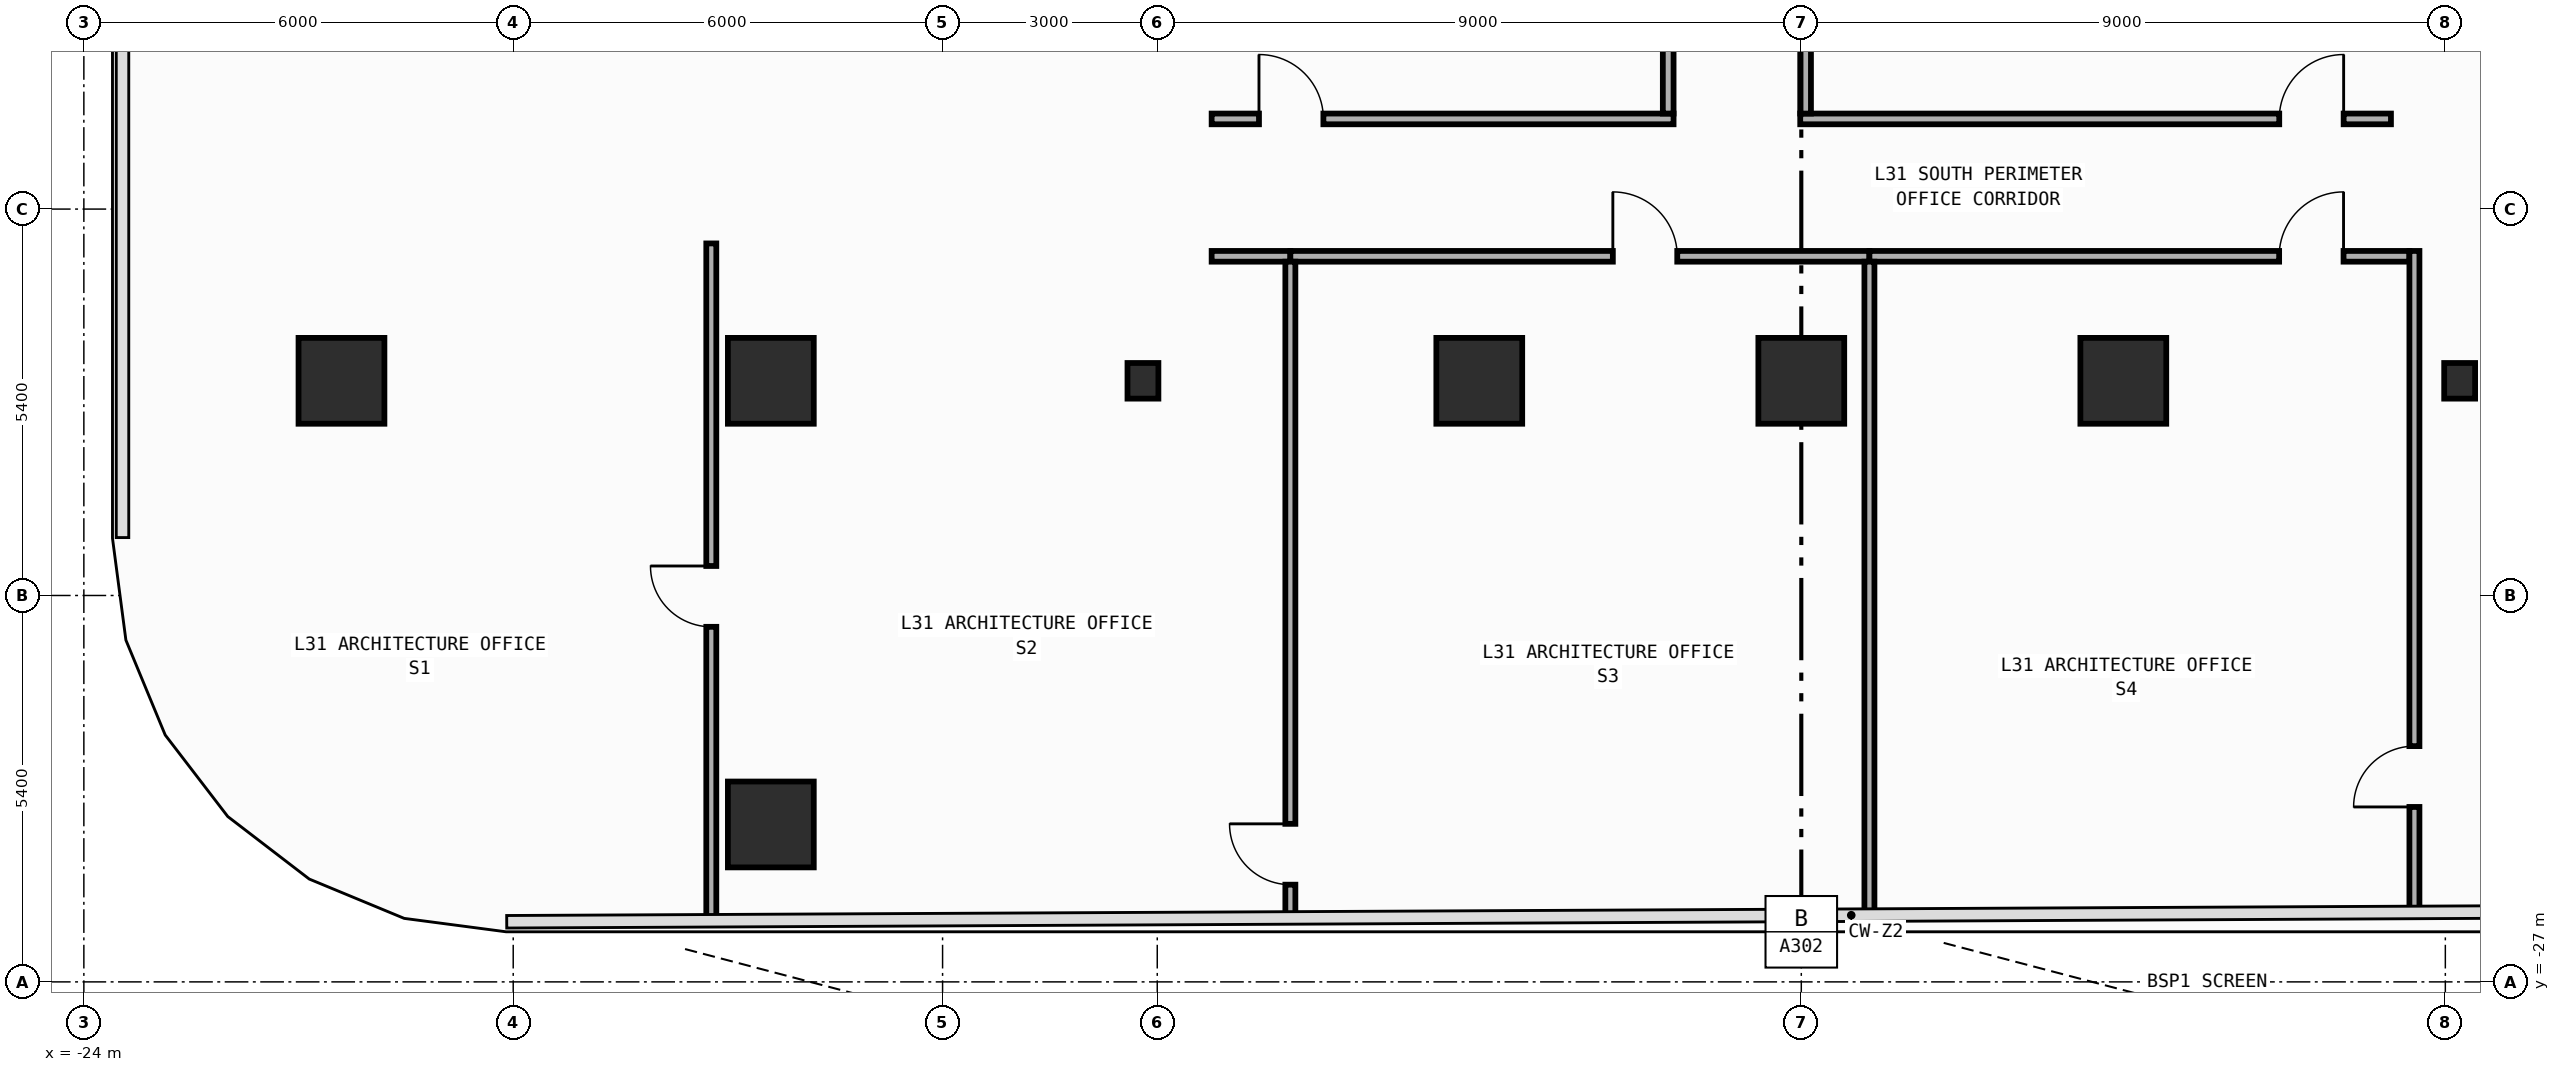
"""IFC4 building model, lengths in metres.
Left out: names, types, materials, properties, quantities, classifications, styles, units other than length and angle.
Written with IfcOpenShell. Run it as: python <this file> out.ifc"""

import sys

from ifc_helpers import new_model, si_unit, direction, frame, frame_2d, origin, origin_2d, place, context, subcontext, project, spatial, rectangle, i_section, extrude, element, fill, save


model = new_model("IFC4")
c1 = context("Model", 3, precision=1e-05, world=origin(), true_north=direction((0.0, 1.0)))
c2 = subcontext(c1, "Body", "Model", "MODEL_VIEW")
j1 = project(units=[si_unit("LENGTHUNIT", "METRE"), si_unit("PLANEANGLEUNIT", "RADIAN")], contexts=[c1])
p1 = place(None, origin())
s1 = spatial("IfcSite", under=j1, at=p1, CompositionType="ELEMENT")
p2 = place(p1, origin())
s2 = spatial("IfcBuilding", under=s1, at=p2, CompositionType="ELEMENT")
p3 = place(p2, frame((0.0, 0.0, 135.2)))
s3 = spatial("IfcBuildingStorey", under=s2, at=p3, CompositionType="ELEMENT", Elevation=135.2)
for number, where, z_axis, x_axis in (
    (1, (-9.2, -18.6, 0.0), (0.0, 0.0, 1.0), (1.0, 0.0, 0.0)),
    (2, (9.2, -18.6, 0.0), (0.0, 0.0, 1.0), (1.0, 0.0, 0.0)),
):
    element("IfcColumn", number, at=place(p3, frame(where, z_axis=z_axis, x_axis=x_axis)), inside=s3, PredefinedType="COLUMN", context=c2, shape_type="SweptSolid", body=[
        extrude(i_section(OverallWidth=0.432, OverallDepth=0.498, WebThickness=0.045, FlangeThickness=0.07, FilletRadius=0.022, at=origin_2d()), origin(), (0.0, 0.0, 1.0), 4.2),
    ])
for number, where, z_axis, x_axis in (
    (3, (-20.4, -18.6, 0.0), (0.0, 0.0, 1.0), (1.0, 0.0, 0.0)),
    (4, (-14.4, -18.6, 0.0), (0.0, 0.0, 1.0), (1.0, 0.0, 0.0)),
    (5, (-4.5, -18.6, 0.0), (0.0, 0.0, 1.0), (1.0, 0.0, 0.0)),
    (6, (0.0, -18.6, 0.0), (0.0, 0.0, 1.0), (1.0, 0.0, 0.0)),
    (7, (4.5, -18.6, 0.0), (0.0, 0.0, 1.0), (1.0, 0.0, 0.0)),
    (8, (-14.4, -24.8, 0.0), (0.0, 0.0, 1.0), (1.0, 0.0, 0.0)),
):
    element("IfcColumn", number, at=place(p3, frame(where, z_axis=z_axis, x_axis=x_axis)), inside=s3, PredefinedType="COLUMN", context=c2, shape_type="SweptSolid", body=[
        extrude(rectangle(XDim=1.2, YDim=1.2, at=origin_2d()), origin(), (0.0, 0.0, 1.0), 4.2),
    ])
p4 = place(p3, frame((-8.24, -16.86, 0.0), z_axis=(0.0, 0.0, 1.0), x_axis=(1.0, 0.0, 0.0)))
e9 = element("IfcWall", 9, at=p4, inside=s3, PredefinedType="PARTITIONING", context=c2, shape_type="SweptSolid", body=[
    extrude(rectangle(XDim=1.1, YDim=0.15, at=frame_2d((0.55, 0.0))), origin(), (0.0, 0.0, 1.0), 3.94),
])
p5 = place(p3, frame((-7.14, -16.86, 0.0), z_axis=(0.0, 0.0, 1.0), x_axis=(1.0, 0.0, 0.0)))
e10 = element("IfcWall", 10, at=p5, inside=s3, PredefinedType="PARTITIONING", context=c2, shape_type="SweptSolid", body=[
    extrude(rectangle(XDim=8.092, YDim=0.15, at=frame_2d((4.046, 0.0))), origin(), (0.0, 0.0, 1.0), 3.94),
])
p6 = place(p5, frame((4.507, 0.0, 0.0)))
e11 = element("IfcOpeningElement", 11, at=p6, cuts=e10, PredefinedType="OPENING", context=c2, shape_type="SweptSolid", body=[
    extrude(rectangle(XDim=0.9, YDim=2.15, at=frame_2d((0.45, 1.075))), frame((0.0, 0.085, 0.0), z_axis=(0.0, -1.0, 0.0), x_axis=(1.0, 0.0, 0.0)), (0.0, 0.0, 1.0), 0.17),
])
p7 = place(p3, frame((0.952, -16.86, 0.0), z_axis=(0.0, 0.0, 1.0), x_axis=(1.0, 0.0, 0.0)))
e12 = element("IfcWall", 12, at=p7, inside=s3, PredefinedType="PARTITIONING", context=c2, shape_type="SweptSolid", body=[
    extrude(rectangle(XDim=7.546, YDim=0.15, at=frame_2d((3.773, 0.0))), origin(), (0.0, 0.0, 1.0), 3.94),
])
p8 = place(p7, frame((5.726, 0.0, 0.0)))
e13 = element("IfcOpeningElement", 13, at=p8, cuts=e12, PredefinedType="OPENING", context=c2, shape_type="SweptSolid", body=[
    extrude(rectangle(XDim=0.9, YDim=2.15, at=frame_2d((0.45, 1.075))), frame((0.0, 0.085, 0.0), z_axis=(0.0, -1.0, 0.0), x_axis=(1.0, 0.0, 0.0)), (0.0, 0.0, 1.0), 0.17),
])
p9 = place(p3, frame((-8.24, -14.94, 0.0), z_axis=(0.0, 0.0, 1.0), x_axis=(1.0, 0.0, 0.0)))
e14 = element("IfcWall", 14, at=p9, inside=s3, PredefinedType="PARTITIONING", context=c2, shape_type="SweptSolid", body=[
    extrude(rectangle(XDim=6.455, YDim=0.15, at=frame_2d((3.228, 0.0))), origin(), (0.0, 0.0, 1.0), 3.94),
])
p10 = place(p9, frame((0.662, 0.0, 0.0)))
e15 = element("IfcOpeningElement", 15, at=p10, cuts=e14, PredefinedType="OPENING", context=c2, shape_type="SweptSolid", body=[
    extrude(rectangle(XDim=0.9, YDim=2.15, at=frame_2d((0.45, 1.075))), frame((0.0, 0.085, 0.0), z_axis=(0.0, -1.0, 0.0), x_axis=(1.0, 0.0, 0.0)), (0.0, 0.0, 1.0), 0.17),
])
p11 = place(p3, frame((-0.015, -14.94, 0.0), z_axis=(0.0, 0.0, 1.0), x_axis=(1.0, 0.0, 0.0)))
e16 = element("IfcWall", 16, at=p11, inside=s3, PredefinedType="PARTITIONING", context=c2, shape_type="SweptSolid", body=[
    extrude(rectangle(XDim=8.255, YDim=0.15, at=frame_2d((4.127, 0.0))), origin(), (0.0, 0.0, 1.0), 3.94),
])
p12 = place(p11, frame((6.694, 0.0, 0.0)))
e17 = element("IfcOpeningElement", 17, at=p12, cuts=e16, PredefinedType="OPENING", context=c2, shape_type="SweptSolid", body=[
    extrude(rectangle(XDim=0.9, YDim=2.15, at=frame_2d((0.45, 1.075))), frame((0.0, 0.085, 0.0), z_axis=(0.0, -1.0, 0.0), x_axis=(1.0, 0.0, 0.0)), (0.0, 0.0, 1.0), 0.17),
])
p13 = place(p3, frame((-1.86, -14.865, 0.0), z_axis=(0.0, 0.0, 1.0), x_axis=(0.0, 1.0, 0.0)))
e18 = element("IfcWall", 18, at=p13, inside=s3, PredefinedType="PARTITIONING", context=c2, shape_type="SweptSolid", body=[
    extrude(rectangle(XDim=5.675, YDim=0.15, at=frame_2d((2.837, 0.0))), origin(), (0.0, 0.0, 1.0), 3.94),
])
p14 = place(p13, frame((4.315, 0.0, 0.0)))
e19 = element("IfcOpeningElement", 19, at=p14, cuts=e18, PredefinedType="OPENING", context=c2, shape_type="SweptSolid", body=[
    extrude(rectangle(XDim=0.9, YDim=2.15, at=frame_2d((0.45, 1.075))), frame((0.0, 0.085, 0.0), z_axis=(0.0, -1.0, 0.0), x_axis=(1.0, 0.0, 0.0)), (0.0, 0.0, 1.0), 0.17),
])
p15 = place(p3, frame((0.06, -14.865, 0.0), z_axis=(0.0, 0.0, 1.0), x_axis=(0.0, 1.0, 0.0)))
e20 = element("IfcWall", 20, at=p15, inside=s3, PredefinedType="PARTITIONING", context=c2, shape_type="SweptSolid", body=[
    extrude(rectangle(XDim=5.675, YDim=0.15, at=frame_2d((2.837, 0.0))), origin(), (0.0, 0.0, 1.0), 3.94),
])
p16 = place(p15, frame((4.315, 0.0, 0.0)))
e21 = element("IfcOpeningElement", 21, at=p16, cuts=e20, PredefinedType="OPENING", context=c2, shape_type="SweptSolid", body=[
    extrude(rectangle(XDim=0.9, YDim=2.15, at=frame_2d((0.45, 1.075))), frame((0.0, 0.085, 0.0), z_axis=(0.0, -1.0, 0.0), x_axis=(1.0, 0.0, 0.0)), (0.0, 0.0, 1.0), 0.17),
])
p17 = place(p3, frame((-15.232, -26.141, 0.0), z_axis=(0.0, 0.0, 1.0), x_axis=(0.0, 1.0, 0.0)))
e22 = element("IfcWall", 22, at=p17, inside=s3, PredefinedType="PARTITIONING", context=c2, shape_type="SweptSolid", body=[
    extrude(rectangle(XDim=9.461, YDim=0.14, at=frame_2d((4.73, 0.0))), origin(), (0.0, 0.0, 1.0), 3.94),
])
p18 = place(p17, frame((4.103, 0.0, 0.0)))
e23 = element("IfcOpeningElement", 23, at=p18, cuts=e22, PredefinedType="OPENING", context=c2, shape_type="SweptSolid", body=[
    extrude(rectangle(XDim=0.85, YDim=2.1, at=frame_2d((0.425, 1.05))), frame((0.0, 0.08, 0.0), z_axis=(0.0, -1.0, 0.0), x_axis=(1.0, 0.0, 0.0)), (0.0, 0.0, 1.0), 0.16),
])
p19 = place(p3, frame((-7.14, -26.101, 0.0), z_axis=(0.0, 0.0, 1.0), x_axis=(0.0, 1.0, 0.0)))
e24 = element("IfcWall", 24, at=p19, inside=s3, PredefinedType="PARTITIONING", context=c2, shape_type="SweptSolid", body=[
    extrude(rectangle(XDim=9.166, YDim=0.14, at=frame_2d((4.583, 0.0))), origin(), (0.0, 0.0, 1.0), 3.94),
])
p20 = place(p19, frame((0.46, 0.0, 0.0)))
e25 = element("IfcOpeningElement", 25, at=p20, cuts=e24, PredefinedType="OPENING", context=c2, shape_type="SweptSolid", body=[
    extrude(rectangle(XDim=0.85, YDim=2.1, at=frame_2d((0.425, 1.05))), frame((0.0, 0.08, 0.0), z_axis=(0.0, -1.0, 0.0), x_axis=(1.0, 0.0, 0.0)), (0.0, 0.0, 1.0), 0.16),
])
p21 = place(p3, frame((0.952, -26.062, 0.0), z_axis=(0.0, 0.0, 1.0), x_axis=(0.0, 1.0, 0.0)))
e26 = element("IfcWall", 26, at=p21, inside=s3, PredefinedType="PARTITIONING", context=c2, shape_type="SweptSolid", body=[
    extrude(rectangle(XDim=9.127, YDim=0.14, at=frame_2d((4.563, 0.0))), origin(), (0.0, 0.0, 1.0), 3.94),
])
p22 = place(p3, frame((8.568, -26.025, 0.0), z_axis=(0.0, 0.0, 1.0), x_axis=(0.0, 1.0, 0.0)))
e27 = element("IfcWall", 27, at=p22, inside=s3, PredefinedType="PARTITIONING", context=c2, shape_type="SweptSolid", body=[
    extrude(rectangle(XDim=9.24, YDim=0.14, at=frame_2d((4.62, 0.0))), origin(), (0.0, 0.0, 1.0), 3.94),
])
p23 = place(p22, frame((1.469, 0.0, 0.0)))
e28 = element("IfcOpeningElement", 28, at=p23, cuts=e27, PredefinedType="OPENING", context=c2, shape_type="SweptSolid", body=[
    extrude(rectangle(XDim=0.85, YDim=2.1, at=frame_2d((0.425, 1.05))), frame((0.0, 0.08, 0.0), z_axis=(0.0, -1.0, 0.0), x_axis=(1.0, 0.0, 0.0)), (0.0, 0.0, 1.0), 0.16),
])
p24 = place(p6, origin())
e29 = element("IfcDoor", 29, at=p24, inside=s3, OperationType="SINGLE_SWING_LEFT", PredefinedType="DOOR", context=c2, shape_type="SweptSolid", body=[
    extrude(rectangle(XDim=0.9, YDim=2.15, at=frame_2d((0.45, 1.075))), frame((0.0, 0.025, 0.0), z_axis=(0.0, -1.0, 0.0), x_axis=(1.0, 0.0, 0.0)), (0.0, 0.0, 1.0), 0.05),
])
fill(e11, e29)
p25 = place(p8, origin())
e30 = element("IfcDoor", 30, at=p25, inside=s3, OperationType="SINGLE_SWING_RIGHT", PredefinedType="DOOR", context=c2, shape_type="SweptSolid", body=[
    extrude(rectangle(XDim=0.9, YDim=2.15, at=frame_2d((0.45, 1.075))), frame((0.0, 0.025, 0.0), z_axis=(0.0, -1.0, 0.0), x_axis=(1.0, 0.0, 0.0)), (0.0, 0.0, 1.0), 0.05),
])
fill(e13, e30)
p26 = place(p10, origin())
e31 = element("IfcDoor", 31, at=p26, inside=s3, OperationType="SINGLE_SWING_LEFT", PredefinedType="DOOR", context=c2, shape_type="SweptSolid", body=[
    extrude(rectangle(XDim=0.9, YDim=2.15, at=frame_2d((0.45, 1.075))), frame((0.0, 0.025, 0.0), z_axis=(0.0, -1.0, 0.0), x_axis=(1.0, 0.0, 0.0)), (0.0, 0.0, 1.0), 0.05),
])
fill(e15, e31)
p27 = place(p12, origin())
e32 = element("IfcDoor", 32, at=p27, inside=s3, OperationType="SINGLE_SWING_RIGHT", PredefinedType="DOOR", context=c2, shape_type="SweptSolid", body=[
    extrude(rectangle(XDim=0.9, YDim=2.15, at=frame_2d((0.45, 1.075))), frame((0.0, 0.025, 0.0), z_axis=(0.0, -1.0, 0.0), x_axis=(1.0, 0.0, 0.0)), (0.0, 0.0, 1.0), 0.05),
])
fill(e17, e32)
p28 = place(p23, origin())
e33 = element("IfcDoor", 33, at=p28, inside=s3, OperationType="SINGLE_SWING_LEFT", PredefinedType="DOOR", context=c2, shape_type="SweptSolid", body=[
    extrude(rectangle(XDim=0.85, YDim=2.1, at=frame_2d((0.425, 1.05))), frame((0.0, 0.025, 0.0), z_axis=(0.0, -1.0, 0.0), x_axis=(1.0, 0.0, 0.0)), (0.0, 0.0, 1.0), 0.05),
])
fill(e28, e33)
p29 = place(p20, origin())
e34 = element("IfcDoor", 34, at=p29, inside=s3, OperationType="SINGLE_SWING_RIGHT", PredefinedType="DOOR", context=c2, shape_type="SweptSolid", body=[
    extrude(rectangle(XDim=0.85, YDim=2.1, at=frame_2d((0.425, 1.05))), frame((0.0, 0.025, 0.0), z_axis=(0.0, -1.0, 0.0), x_axis=(1.0, 0.0, 0.0)), (0.0, 0.0, 1.0), 0.05),
])
fill(e25, e34)
p30 = place(p18, origin())
e35 = element("IfcDoor", 35, at=p30, inside=s3, OperationType="SINGLE_SWING_RIGHT", PredefinedType="DOOR", context=c2, shape_type="SweptSolid", body=[
    extrude(rectangle(XDim=0.85, YDim=2.1, at=frame_2d((0.425, 1.05))), frame((0.0, 0.025, 0.0), z_axis=(0.0, -1.0, 0.0), x_axis=(1.0, 0.0, 0.0)), (0.0, 0.0, 1.0), 0.05),
])
fill(e23, e35)
save(model, sys.argv[1])
